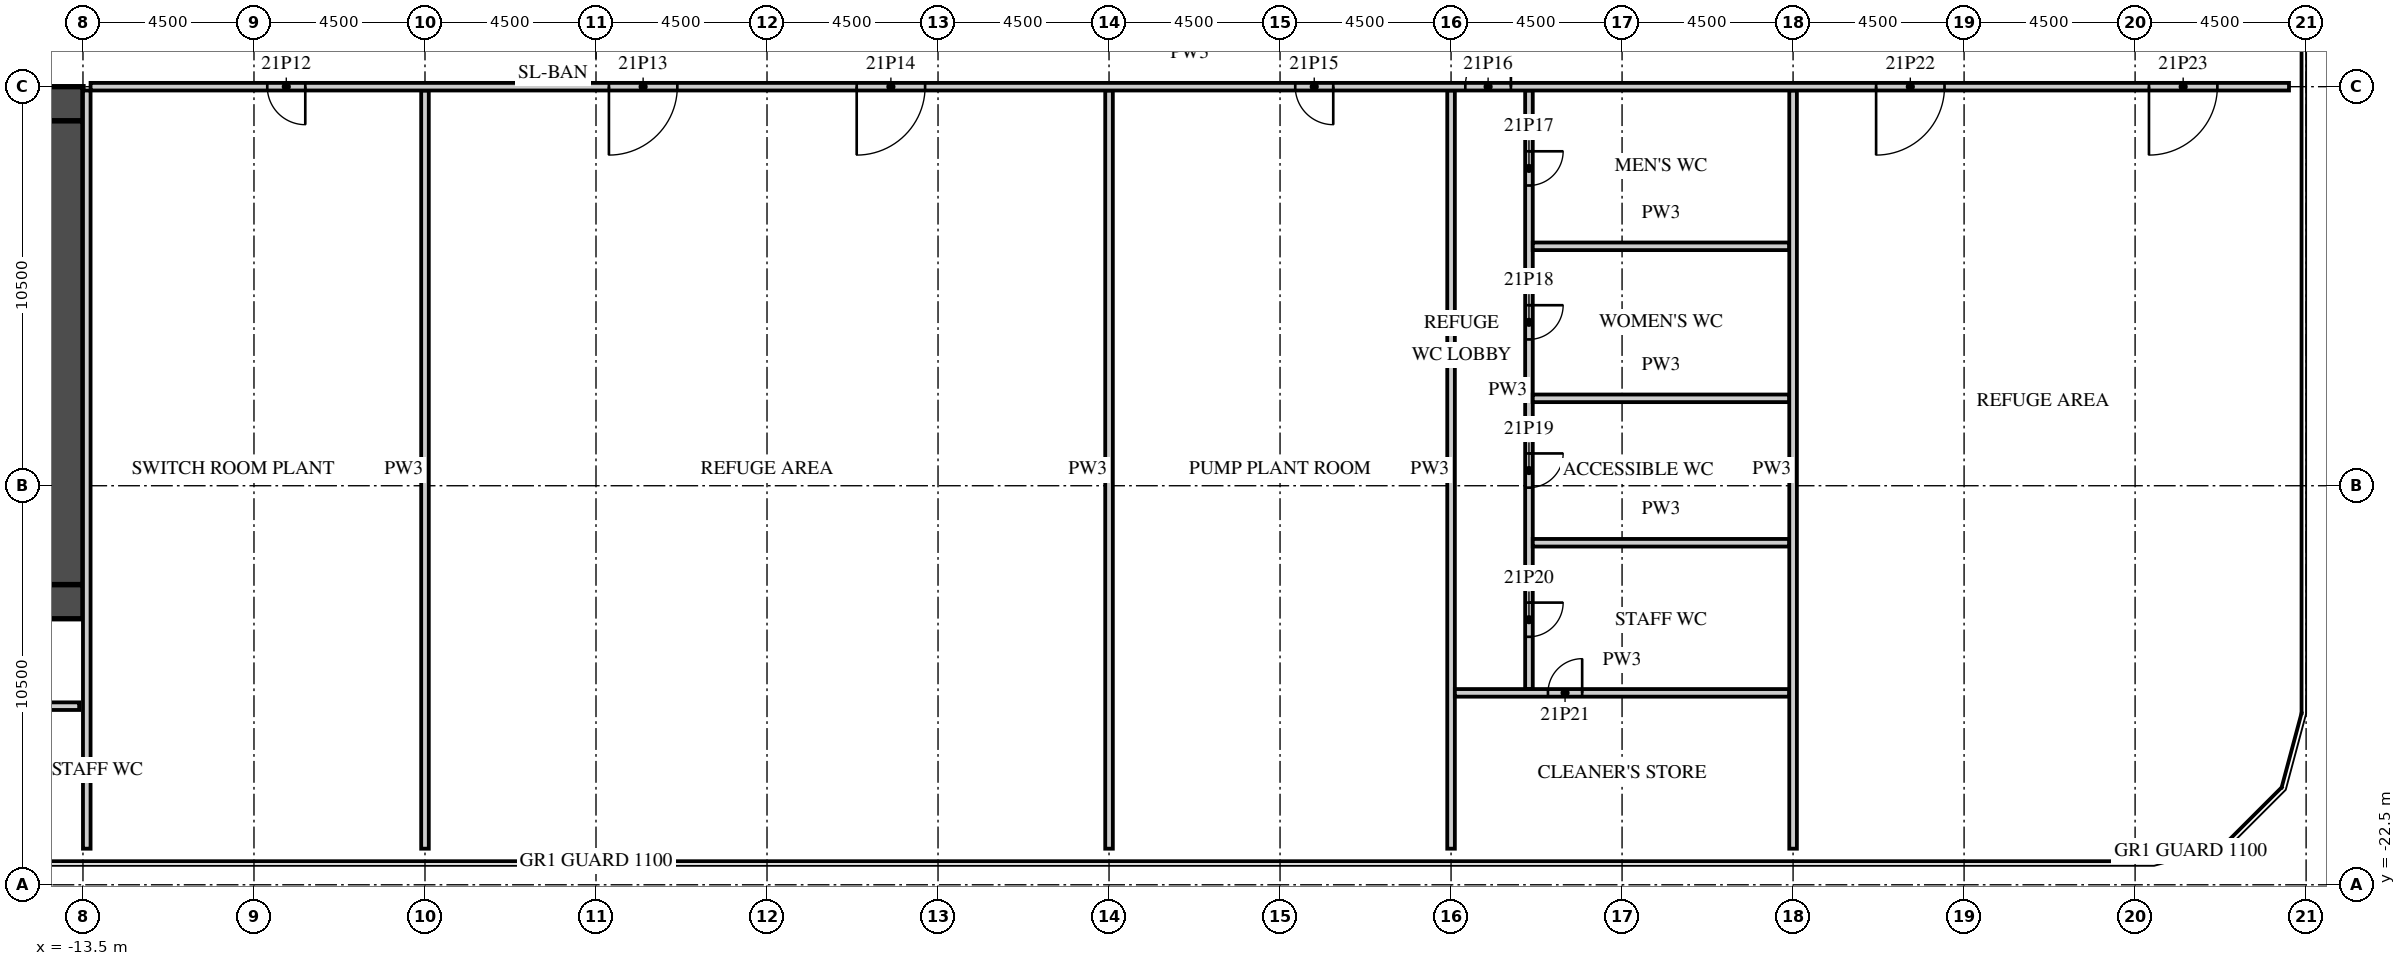
"""IFC4 building model, lengths in metres.
Left out: names, types, materials, properties, quantities, classifications, styles, units other than length and angle.
Written with IfcOpenShell. Run it as: python <this file> out.ifc"""

import sys

from ifc_helpers import new_model, si_unit, direction, frame, frame_2d, origin, place, context, subcontext, project, spatial, rectangle, extrude, element, fill, save


model = new_model("IFC4")
c1 = context("Model", 3, precision=1e-05, world=origin(), true_north=direction((0.0, 1.0)))
c2 = subcontext(c1, "Body", "Model", "MODEL_VIEW")
j1 = project(units=[si_unit("LENGTHUNIT", "METRE"), si_unit("PLANEANGLEUNIT", "RADIAN")], contexts=[c1])
p1 = place(None, origin())
s1 = spatial("IfcSite", under=j1, at=p1, CompositionType="ELEMENT")
p2 = place(p1, origin())
s2 = spatial("IfcBuilding", under=s1, at=p2, CompositionType="ELEMENT")
p3 = place(p2, frame((0.0, 0.0, 99.6)))
s3 = spatial("IfcBuildingStorey", under=s2, at=p3, CompositionType="ELEMENT", Elevation=99.6)
p4 = place(p3, frame((-31.5, -1.95, 0.0), z_axis=(0.0, 0.0, 1.0), x_axis=(1.0, 0.0, 0.0)))
e1 = element("IfcWall", 1, at=p4, inside=s3, PredefinedType="SHEAR", context=c2, shape_type="SweptSolid", body=[
    extrude(rectangle(XDim=18.0, YDim=0.9, at=frame_2d((9.0, 0.0))), origin(), (0.0, 0.0, 1.0), 4.2),
])
p5 = place(p4, frame((14.725, 0.0, 0.0)))
e2 = element("IfcOpeningElement", 2, at=p5, cuts=e1, PredefinedType="OPENING", context=c2, shape_type="SweptSolid", body=[
    extrude(rectangle(XDim=1.8, YDim=2.1, at=frame_2d((0.9, 1.05))), frame((0.0, 0.46, 0.0), z_axis=(0.0, -1.0, 0.0), x_axis=(1.0, 0.0, 0.0)), (0.0, 0.0, 1.0), 0.92),
])
p6 = place(p3, frame((-20.3, -15.05, 0.0), z_axis=(0.0, 0.0, 1.0), x_axis=(1.0, 0.0, 0.0)))
e3 = element("IfcWall", 3, at=p6, inside=s3, PredefinedType="SHEAR", context=c2, shape_type="SweptSolid", body=[
    extrude(rectangle(XDim=6.8, YDim=0.9, at=frame_2d((3.4, 0.0))), origin(), (0.0, 0.0, 1.0), 4.2),
])
p7 = place(p6, frame((0.875, 0.0, 0.0)))
e4 = element("IfcOpeningElement", 4, at=p7, cuts=e3, PredefinedType="OPENING", context=c2, shape_type="SweptSolid", body=[
    extrude(rectangle(XDim=1.2, YDim=2.1, at=frame_2d((0.6, 1.05))), frame((0.0, 0.46, 0.0), z_axis=(0.0, -1.0, 0.0), x_axis=(1.0, 0.0, 0.0)), (0.0, 0.0, 1.0), 0.92),
])
p8 = place(p3, frame((-13.95, -14.6, 0.0), z_axis=(0.0, 0.0, 1.0), x_axis=(0.0, 1.0, 0.0)))
e5 = element("IfcWall", 5, at=p8, inside=s3, PredefinedType="SHEAR", context=c2, shape_type="SweptSolid", body=[
    extrude(rectangle(XDim=12.2, YDim=0.9, at=frame_2d((6.1, 0.0))), origin(), (0.0, 0.0, 1.0), 4.2),
])
p9 = place(p3, frame((-44.55, -17.8, 0.0), z_axis=(0.0, 0.0, 1.0), x_axis=(1.0, 0.0, 0.0)))
e6 = element("IfcWall", 6, at=p9, inside=s3, PredefinedType="PARTITIONING", context=c2, shape_type="SweptSolid", body=[
    extrude(rectangle(XDim=30.95, YDim=0.2, at=frame_2d((15.475, 0.0))), origin(), (0.0, 0.0, 1.0), 4.2),
])
p10 = place(p9, frame((15.038, 0.0, 0.0)))
e7 = element("IfcOpeningElement", 7, at=p10, cuts=e6, PredefinedType="OPENING", context=c2, shape_type="SweptSolid", body=[
    extrude(rectangle(XDim=0.9, YDim=2.1, at=frame_2d((0.45, 1.05))), frame((0.0, 0.11, 0.0), z_axis=(0.0, -1.0, 0.0), x_axis=(1.0, 0.0, 0.0)), (0.0, 0.0, 1.0), 0.22),
])
p11 = place(p9, frame((23.337, 0.0, 0.0)))
e8 = element("IfcOpeningElement", 8, at=p11, cuts=e6, PredefinedType="OPENING", context=c2, shape_type="SweptSolid", body=[
    extrude(rectangle(XDim=0.9, YDim=2.1, at=frame_2d((0.45, 1.05))), frame((0.0, 0.11, 0.0), z_axis=(0.0, -1.0, 0.0), x_axis=(1.0, 0.0, 0.0)), (0.0, 0.0, 1.0), 0.22),
])
for number, where, z_axis, x_axis in (
    (9, (-4.5, -21.55, 0.0), (0.0, 0.0, 1.0), (0.0, 1.0, 0.0)),
    (10, (13.5, -21.55, 0.0), (0.0, 0.0, 1.0), (0.0, 1.0, 0.0)),
    (11, (22.5, -21.55, 0.0), (0.0, 0.0, 1.0), (0.0, 1.0, 0.0)),
):
    element("IfcWall", number, at=place(p3, frame(where, z_axis=z_axis, x_axis=x_axis)), inside=s3, PredefinedType="PARTITIONING", context=c2, shape_type="SweptSolid", body=[
        extrude(rectangle(XDim=19.95, YDim=0.2, at=frame_2d((9.975, 0.0))), origin(), (0.0, 0.0, 1.0), 4.2),
    ])
p12 = place(p3, frame((24.55, -17.35, 0.0), z_axis=(0.0, 0.0, 1.0), x_axis=(0.0, 1.0, 0.0)))
e12 = element("IfcWall", 12, at=p12, inside=s3, PredefinedType="PARTITIONING", context=c2, shape_type="SweptSolid", body=[
    extrude(rectangle(XDim=15.75, YDim=0.2, at=frame_2d((7.875, 0.0))), origin(), (0.0, 0.0, 1.0), 4.2),
])
p13 = place(p12, frame((13.25, 0.0, 0.0)))
e13 = element("IfcOpeningElement", 13, at=p13, cuts=e12, PredefinedType="OPENING", context=c2, shape_type="SweptSolid", body=[
    extrude(rectangle(XDim=0.9, YDim=2.1, at=frame_2d((0.45, 1.05))), frame((0.0, 0.11, 0.0), z_axis=(0.0, -1.0, 0.0), x_axis=(1.0, 0.0, 0.0)), (0.0, 0.0, 1.0), 0.22),
])
p14 = place(p12, frame((9.2, 0.0, 0.0)))
e14 = element("IfcOpeningElement", 14, at=p14, cuts=e12, PredefinedType="OPENING", context=c2, shape_type="SweptSolid", body=[
    extrude(rectangle(XDim=0.9, YDim=2.1, at=frame_2d((0.45, 1.05))), frame((0.0, 0.11, 0.0), z_axis=(0.0, -1.0, 0.0), x_axis=(1.0, 0.0, 0.0)), (0.0, 0.0, 1.0), 0.22),
])
p15 = place(p12, frame((5.3, 0.0, 0.0)))
e15 = element("IfcOpeningElement", 15, at=p15, cuts=e12, PredefinedType="OPENING", context=c2, shape_type="SweptSolid", body=[
    extrude(rectangle(XDim=0.9, YDim=2.1, at=frame_2d((0.45, 1.05))), frame((0.0, 0.11, 0.0), z_axis=(0.0, -1.0, 0.0), x_axis=(1.0, 0.0, 0.0)), (0.0, 0.0, 1.0), 0.22),
])
p16 = place(p12, frame((1.375, 0.0, 0.0)))
e16 = element("IfcOpeningElement", 16, at=p16, cuts=e12, PredefinedType="OPENING", context=c2, shape_type="SweptSolid", body=[
    extrude(rectangle(XDim=0.9, YDim=2.1, at=frame_2d((0.45, 1.05))), frame((0.0, 0.11, 0.0), z_axis=(0.0, -1.0, 0.0), x_axis=(1.0, 0.0, 0.0)), (0.0, 0.0, 1.0), 0.22),
])
for number, where, z_axis, x_axis in (
    (17, (24.65, -5.7, 0.0), (0.0, 0.0, 1.0), (1.0, 0.0, 0.0)),
    (18, (24.65, -9.7, 0.0), (0.0, 0.0, 1.0), (1.0, 0.0, 0.0)),
    (19, (24.65, -13.5, 0.0), (0.0, 0.0, 1.0), (1.0, 0.0, 0.0)),
):
    element("IfcWall", number, at=place(p3, frame(where, z_axis=z_axis, x_axis=x_axis)), inside=s3, PredefinedType="PARTITIONING", context=c2, shape_type="SweptSolid", body=[
        extrude(rectangle(XDim=6.75, YDim=0.2, at=frame_2d((3.375, 0.0))), origin(), (0.0, 0.0, 1.0), 4.2),
    ])
p17 = place(p3, frame((22.6, -17.45, 0.0), z_axis=(0.0, 0.0, 1.0), x_axis=(1.0, 0.0, 0.0)))
e20 = element("IfcWall", 20, at=p17, inside=s3, PredefinedType="PARTITIONING", context=c2, shape_type="SweptSolid", body=[
    extrude(rectangle(XDim=8.8, YDim=0.2, at=frame_2d((4.4, 0.0))), origin(), (0.0, 0.0, 1.0), 4.2),
])
p18 = place(p17, frame((2.45, 0.0, 0.0)))
e21 = element("IfcOpeningElement", 21, at=p18, cuts=e20, PredefinedType="OPENING", context=c2, shape_type="SweptSolid", body=[
    extrude(rectangle(XDim=0.9, YDim=2.1, at=frame_2d((0.45, 1.05))), frame((0.0, 0.11, 0.0), z_axis=(0.0, -1.0, 0.0), x_axis=(1.0, 0.0, 0.0)), (0.0, 0.0, 1.0), 0.22),
])
p19 = place(p3, frame((31.5, -21.55, 0.0), z_axis=(0.0, 0.0, 1.0), x_axis=(0.0, 1.0, 0.0)))
e22 = element("IfcWall", 22, at=p19, inside=s3, PredefinedType="PARTITIONING", context=c2, shape_type="SweptSolid", body=[
    extrude(rectangle(XDim=19.95, YDim=0.2, at=frame_2d((9.975, 0.0))), origin(), (0.0, 0.0, 1.0), 4.2),
])
p20 = place(p3, frame((-13.3, -1.5, 0.0), z_axis=(0.0, 0.0, 1.0), x_axis=(1.0, 0.0, 0.0)))
e23 = element("IfcWall", 23, at=p20, inside=s3, PredefinedType="PARTITIONING", context=c2, shape_type="SweptSolid", body=[
    extrude(rectangle(XDim=57.85, YDim=0.2, at=frame_2d((28.925, 0.0))), origin(), (0.0, 0.0, 1.0), 4.2),
])
p21 = place(p20, frame((4.65, 0.0, 0.0)))
e24 = element("IfcOpeningElement", 24, at=p21, cuts=e23, PredefinedType="OPENING", context=c2, shape_type="SweptSolid", body=[
    extrude(rectangle(XDim=1.0, YDim=2.1, at=frame_2d((0.5, 1.05))), frame((0.0, 0.11, 0.0), z_axis=(0.0, -1.0, 0.0), x_axis=(1.0, 0.0, 0.0)), (0.0, 0.0, 1.0), 0.22),
])
p22 = place(p20, frame((13.64, 0.0, 0.0)))
e25 = element("IfcOpeningElement", 25, at=p22, cuts=e23, PredefinedType="OPENING", context=c2, shape_type="SweptSolid", body=[
    extrude(rectangle(XDim=1.8, YDim=2.1, at=frame_2d((0.9, 1.05))), frame((0.0, 0.11, 0.0), z_axis=(0.0, -1.0, 0.0), x_axis=(1.0, 0.0, 0.0)), (0.0, 0.0, 1.0), 0.22),
])
p23 = place(p20, frame((20.16, 0.0, 0.0)))
e26 = element("IfcOpeningElement", 26, at=p23, cuts=e23, PredefinedType="OPENING", context=c2, shape_type="SweptSolid", body=[
    extrude(rectangle(XDim=1.8, YDim=2.1, at=frame_2d((0.9, 1.05))), frame((0.0, 0.11, 0.0), z_axis=(0.0, -1.0, 0.0), x_axis=(1.0, 0.0, 0.0)), (0.0, 0.0, 1.0), 0.22),
])
p24 = place(p20, frame((31.7, 0.0, 0.0)))
e27 = element("IfcOpeningElement", 27, at=p24, cuts=e23, PredefinedType="OPENING", context=c2, shape_type="SweptSolid", body=[
    extrude(rectangle(XDim=1.0, YDim=2.1, at=frame_2d((0.5, 1.05))), frame((0.0, 0.11, 0.0), z_axis=(0.0, -1.0, 0.0), x_axis=(1.0, 0.0, 0.0)), (0.0, 0.0, 1.0), 0.22),
])
p25 = place(p20, frame((36.175, 0.0, 0.0)))
e28 = element("IfcOpeningElement", 28, at=p25, cuts=e23, PredefinedType="OPENING", context=c2, shape_type="SweptSolid", body=[
    extrude(rectangle(XDim=1.2, YDim=2.1, at=frame_2d((0.6, 1.05))), frame((0.0, 0.11, 0.0), z_axis=(0.0, -1.0, 0.0), x_axis=(1.0, 0.0, 0.0)), (0.0, 0.0, 1.0), 0.22),
])
p26 = place(p20, frame((46.985, 0.0, 0.0)))
e29 = element("IfcOpeningElement", 29, at=p26, cuts=e23, PredefinedType="OPENING", context=c2, shape_type="SweptSolid", body=[
    extrude(rectangle(XDim=1.8, YDim=2.1, at=frame_2d((0.9, 1.05))), frame((0.0, 0.11, 0.0), z_axis=(0.0, -1.0, 0.0), x_axis=(1.0, 0.0, 0.0)), (0.0, 0.0, 1.0), 0.22),
])
p27 = place(p20, frame((54.165, 0.0, 0.0)))
e30 = element("IfcOpeningElement", 30, at=p27, cuts=e23, PredefinedType="OPENING", context=c2, shape_type="SweptSolid", body=[
    extrude(rectangle(XDim=1.8, YDim=2.1, at=frame_2d((0.9, 1.05))), frame((0.0, 0.11, 0.0), z_axis=(0.0, -1.0, 0.0), x_axis=(1.0, 0.0, 0.0)), (0.0, 0.0, 1.0), 0.22),
])
p28 = place(p3, frame((-13.4, -21.55, 0.0), z_axis=(0.0, 0.0, 1.0), x_axis=(0.0, 1.0, 0.0)))
e31 = element("IfcWall", 31, at=p28, inside=s3, PredefinedType="PARTITIONING", context=c2, shape_type="SweptSolid", body=[
    extrude(rectangle(XDim=19.95, YDim=0.2, at=frame_2d((9.975, 0.0))), origin(), (0.0, 0.0, 1.0), 4.2),
])
p29 = place(p21, origin())
e32 = element("IfcDoor", 32, at=p29, inside=s3, OperationType="SINGLE_SWING_RIGHT", PredefinedType="DOOR", context=c2, shape_type="SweptSolid", body=[
    extrude(rectangle(XDim=1.0, YDim=2.1, at=frame_2d((0.5, 1.05))), frame((0.0, 0.025, 0.0), z_axis=(0.0, -1.0, 0.0), x_axis=(1.0, 0.0, 0.0)), (0.0, 0.0, 1.0), 0.05),
])
fill(e24, e32)
p30 = place(p22, origin())
e33 = element("IfcDoor", 33, at=p30, inside=s3, OperationType="DOUBLE_DOOR_DOUBLE_SWING", PredefinedType="DOOR", context=c2, shape_type="SweptSolid", body=[
    extrude(rectangle(XDim=1.8, YDim=2.1, at=frame_2d((0.9, 1.05))), frame((0.0, 0.025, 0.0), z_axis=(0.0, -1.0, 0.0), x_axis=(1.0, 0.0, 0.0)), (0.0, 0.0, 1.0), 0.05),
])
fill(e25, e33)
p31 = place(p23, origin())
e34 = element("IfcDoor", 34, at=p31, inside=s3, OperationType="DOUBLE_DOOR_DOUBLE_SWING", PredefinedType="DOOR", context=c2, shape_type="SweptSolid", body=[
    extrude(rectangle(XDim=1.8, YDim=2.1, at=frame_2d((0.9, 1.05))), frame((0.0, 0.025, 0.0), z_axis=(0.0, -1.0, 0.0), x_axis=(1.0, 0.0, 0.0)), (0.0, 0.0, 1.0), 0.05),
])
fill(e26, e34)
p32 = place(p24, origin())
e35 = element("IfcDoor", 35, at=p32, inside=s3, OperationType="SINGLE_SWING_RIGHT", PredefinedType="DOOR", context=c2, shape_type="SweptSolid", body=[
    extrude(rectangle(XDim=1.0, YDim=2.1, at=frame_2d((0.5, 1.05))), frame((0.0, 0.025, 0.0), z_axis=(0.0, -1.0, 0.0), x_axis=(1.0, 0.0, 0.0)), (0.0, 0.0, 1.0), 0.05),
])
fill(e27, e35)
p33 = place(p25, origin())
e36 = element("IfcDoor", 36, at=p33, inside=s3, OperationType="SINGLE_SWING_RIGHT", PredefinedType="DOOR", context=c2, shape_type="SweptSolid", body=[
    extrude(rectangle(XDim=1.2, YDim=2.1, at=frame_2d((0.6, 1.05))), frame((0.0, 0.025, 0.0), z_axis=(0.0, -1.0, 0.0), x_axis=(1.0, 0.0, 0.0)), (0.0, 0.0, 1.0), 0.05),
])
fill(e28, e36)
p34 = place(p13, origin())
e37 = element("IfcDoor", 37, at=p34, inside=s3, OperationType="SINGLE_SWING_RIGHT", PredefinedType="DOOR", context=c2, shape_type="SweptSolid", body=[
    extrude(rectangle(XDim=0.9, YDim=2.1, at=frame_2d((0.45, 1.05))), frame((0.0, 0.025, 0.0), z_axis=(0.0, -1.0, 0.0), x_axis=(1.0, 0.0, 0.0)), (0.0, 0.0, 1.0), 0.05),
])
fill(e13, e37)
p35 = place(p14, origin())
e38 = element("IfcDoor", 38, at=p35, inside=s3, OperationType="SINGLE_SWING_RIGHT", PredefinedType="DOOR", context=c2, shape_type="SweptSolid", body=[
    extrude(rectangle(XDim=0.9, YDim=2.1, at=frame_2d((0.45, 1.05))), frame((0.0, 0.025, 0.0), z_axis=(0.0, -1.0, 0.0), x_axis=(1.0, 0.0, 0.0)), (0.0, 0.0, 1.0), 0.05),
])
fill(e14, e38)
p36 = place(p15, origin())
e39 = element("IfcDoor", 39, at=p36, inside=s3, OperationType="SINGLE_SWING_RIGHT", PredefinedType="DOOR", context=c2, shape_type="SweptSolid", body=[
    extrude(rectangle(XDim=0.9, YDim=2.1, at=frame_2d((0.45, 1.05))), frame((0.0, 0.025, 0.0), z_axis=(0.0, -1.0, 0.0), x_axis=(1.0, 0.0, 0.0)), (0.0, 0.0, 1.0), 0.05),
])
fill(e15, e39)
p37 = place(p16, origin())
e40 = element("IfcDoor", 40, at=p37, inside=s3, OperationType="SINGLE_SWING_RIGHT", PredefinedType="DOOR", context=c2, shape_type="SweptSolid", body=[
    extrude(rectangle(XDim=0.9, YDim=2.1, at=frame_2d((0.45, 1.05))), frame((0.0, 0.025, 0.0), z_axis=(0.0, -1.0, 0.0), x_axis=(1.0, 0.0, 0.0)), (0.0, 0.0, 1.0), 0.05),
])
fill(e16, e40)
p38 = place(p18, origin())
e41 = element("IfcDoor", 41, at=p38, inside=s3, OperationType="SINGLE_SWING_RIGHT", PredefinedType="DOOR", context=c2, shape_type="SweptSolid", body=[
    extrude(rectangle(XDim=0.9, YDim=2.1, at=frame_2d((0.45, 1.05))), frame((0.0, 0.025, 0.0), z_axis=(0.0, -1.0, 0.0), x_axis=(1.0, 0.0, 0.0)), (0.0, 0.0, 1.0), 0.05),
])
fill(e21, e41)
p39 = place(p26, origin())
e42 = element("IfcDoor", 42, at=p39, inside=s3, OperationType="DOUBLE_DOOR_DOUBLE_SWING", PredefinedType="DOOR", context=c2, shape_type="SweptSolid", body=[
    extrude(rectangle(XDim=1.8, YDim=2.1, at=frame_2d((0.9, 1.05))), frame((0.0, 0.025, 0.0), z_axis=(0.0, -1.0, 0.0), x_axis=(1.0, 0.0, 0.0)), (0.0, 0.0, 1.0), 0.05),
])
fill(e29, e42)
p40 = place(p27, origin())
e43 = element("IfcDoor", 43, at=p40, inside=s3, OperationType="DOUBLE_DOOR_DOUBLE_SWING", PredefinedType="DOOR", context=c2, shape_type="SweptSolid", body=[
    extrude(rectangle(XDim=1.8, YDim=2.1, at=frame_2d((0.9, 1.05))), frame((0.0, 0.025, 0.0), z_axis=(0.0, -1.0, 0.0), x_axis=(1.0, 0.0, 0.0)), (0.0, 0.0, 1.0), 0.05),
])
fill(e30, e43)
save(model, sys.argv[1])
